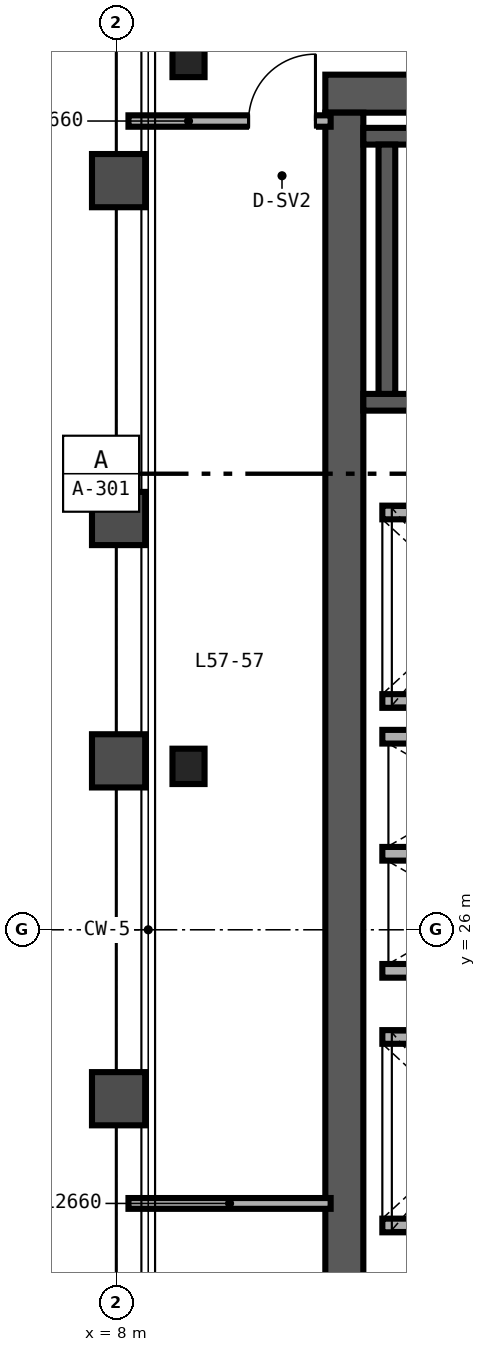
"""IFC4 building model, lengths in metres.
Left out: names, types, materials, properties, quantities, classifications, styles, units other than length and angle.
Written with IfcOpenShell. Run it as: python <this file> out.ifc"""

import sys

from ifc_helpers import new_model, si_unit, direction, frame, frame_2d, origin, origin_2d, place, context, subcontext, project, spatial, rectangle, i_section, extrude, source, transform, mapped, element, fill, save


model = new_model("IFC4")
c1 = context("Model", 3, precision=1e-05, world=origin(), true_north=direction((0.0, 1.0)))
c2 = subcontext(c1, "Body", "Model", "MODEL_VIEW")
j1 = project(units=[si_unit("LENGTHUNIT", "METRE"), si_unit("PLANEANGLEUNIT", "RADIAN")], contexts=[c1])
p1 = place(None, origin())
s1 = spatial("IfcSite", under=j1, at=p1, CompositionType="ELEMENT")
p2 = place(p1, origin())
s2 = spatial("IfcBuilding", under=s1, at=p2, CompositionType="ELEMENT")
p3 = place(p2, frame((0.0, 0.0, 228.0)))
s3 = spatial("IfcBuildingStorey", under=s2, at=p3, CompositionType="ELEMENT", Elevation=228.0)
p4 = place(p3, frame((10.75, 37.0, 0.0), z_axis=(0.0, 0.0, 1.0), x_axis=(1.0, 0.0, 0.0)))
e1 = element("IfcWall", 1, at=p4, inside=s3, PredefinedType="SHEAR", context=c2, shape_type="SweptSolid", body=[
    extrude(rectangle(XDim=12.5, YDim=0.5, at=frame_2d((6.25, 0.0))), origin(), (0.0, 0.0, 1.0), 4.58),
])
p5 = place(p4, frame((10.35, 0.0, 0.0)))
e2 = element("IfcOpeningElement", 2, at=p5, cuts=e1, PredefinedType="OPENING", context=c2, shape_type="SweptSolid", body=[
    extrude(rectangle(XDim=1.0, YDim=2.15, at=frame_2d((0.5, 1.075))), frame((0.0, 0.26, 0.0), z_axis=(0.0, -1.0, 0.0), x_axis=(1.0, 0.0, 0.0)), (0.0, 0.0, 1.0), 0.52),
])
p6 = place(p3, frame((11.0, 15.25, 0.0), z_axis=(0.0, 0.0, 1.0), x_axis=(0.0, 1.0, 0.0)))
e3 = element("IfcWall", 3, at=p6, inside=s3, PredefinedType="SHEAR", context=c2, shape_type="SweptSolid", body=[
    extrude(rectangle(XDim=21.5, YDim=0.5, at=frame_2d((10.75, 0.0))), origin(), (0.0, 0.0, 1.0), 4.58),
])
p7 = place(p3, frame((11.25, 32.94, 0.0), z_axis=(0.0, 0.0, 1.0), x_axis=(1.0, 0.0, 0.0)))
e4 = element("IfcWall", 4, at=p7, inside=s3, PredefinedType="SHEAR", context=c2, shape_type="SweptSolid", body=[
    extrude(rectangle(XDim=8.06, YDim=0.22, at=frame_2d((4.03, 0.0))), origin(), (0.0, 0.0, 1.0), 4.6),
])
p8 = place(p7, frame((0.67, 0.0, 0.0)))
e5 = element("IfcOpeningElement", 5, at=p8, cuts=e4, PredefinedType="OPENING", context=c2, shape_type="SweptSolid", body=[
    extrude(rectangle(XDim=1.05, YDim=2.15, at=frame_2d((0.525, 1.075))), frame((0.0, 0.12, 0.0), z_axis=(0.0, -1.0, 0.0), x_axis=(1.0, 0.0, 0.0)), (0.0, 0.0, 1.0), 0.24),
])
p9 = place(p3, frame((11.25, 36.44, 0.0), z_axis=(0.0, 0.0, 1.0), x_axis=(1.0, 0.0, 0.0)))
e6 = element("IfcWall", 6, at=p9, inside=s3, PredefinedType="SHEAR", context=c2, shape_type="SweptSolid", body=[
    extrude(rectangle(XDim=8.06, YDim=0.22, at=frame_2d((4.03, 0.0))), origin(), (0.0, 0.0, 1.0), 4.6),
])
p10 = place(p3, frame((11.56, 33.05, 0.0), z_axis=(0.0, 0.0, 1.0), x_axis=(0.0, 1.0, 0.0)))
e7 = element("IfcWall", 7, at=p10, inside=s3, PredefinedType="SHEAR", context=c2, shape_type="SweptSolid", body=[
    extrude(rectangle(XDim=3.28, YDim=0.22, at=frame_2d((1.64, 0.0))), origin(), (0.0, 0.0, 1.0), 4.6),
])
m1 = source(origin(), c2, "Body", "SweptSolid", [
    extrude(i_section(OverallWidth=0.422, OverallDepth=0.465, WebThickness=0.045, FlangeThickness=0.073, FilletRadius=0.025, at=origin_2d()), origin(), (0.0, 0.0, 1.0), 4.58),
])
for number, where, z_axis, x_axis in (
    (8, (8.95, 28.15, 0.0), (0.0, 0.0, 1.0), (1.0, 0.0, 0.0)),
    (9, (8.95, 37.45, 0.0), (0.0, 0.0, 1.0), (1.0, 0.0, 0.0)),
):
    element("IfcColumn", number, at=place(p3, frame(where, z_axis=z_axis, x_axis=x_axis)), inside=s3, PredefinedType="COLUMN", context=c2, shape_type="MappedRepresentation", body=[
        mapped(m1, transform((0.0, 0.0, 0.0), scale=1.0)),
    ])
for number, where, z_axis, x_axis in (
    (10, (11.5, 22.11, 0.0), (0.0, 0.0, 1.0), (1.0, 0.0, 0.0)),
    (11, (11.5, 24.59, 0.0), (0.0, 0.0, 1.0), (1.0, 0.0, 0.0)),
    (12, (11.5, 29.01, 0.0), (0.0, 0.0, 1.0), (1.0, 0.0, 0.0)),
    (13, (11.5, 31.49, 0.0), (0.0, 0.0, 1.0), (1.0, 0.0, 0.0)),
):
    element("IfcWall", number, at=place(p3, frame(where, z_axis=z_axis, x_axis=x_axis)), inside=s3, PredefinedType="SOLIDWALL", context=c2, shape_type="SweptSolid", body=[
        extrude(rectangle(XDim=2.5, YDim=0.18, at=frame_2d((1.25, 0.0))), origin(), (0.0, 0.0, 1.0), 4.58),
    ])
for number, where, z_axis, x_axis in (
    (14, (11.5, 25.46, 0.0), (0.0, 0.0, 1.0), (1.0, 0.0, 0.0)),
    (15, (11.5, 27.0, 0.0), (0.0, 0.0, 1.0), (1.0, 0.0, 0.0)),
    (16, (11.5, 28.54, 0.0), (0.0, 0.0, 1.0), (1.0, 0.0, 0.0)),
):
    element("IfcWall", number, at=place(p3, frame(where, z_axis=z_axis, x_axis=x_axis)), inside=s3, PredefinedType="SOLIDWALL", context=c2, shape_type="SweptSolid", body=[
        extrude(rectangle(XDim=2.51, YDim=0.18, at=frame_2d((1.255, 0.0))), origin(), (0.0, 0.0, 1.0), 4.58),
    ])
p11 = place(p3, frame((8.16, 36.64, 0.0), z_axis=(0.0, 0.0, 1.0), x_axis=(1.0, 0.0, 0.0)))
e17 = element("IfcWall", 17, at=p11, inside=s3, PredefinedType="PARTITIONING", context=c2, shape_type="SweptSolid", body=[
    extrude(rectangle(XDim=2.66, YDim=0.15, at=frame_2d((1.33, 0.0))), origin(), (0.0, 0.0, 1.0), 3.963),
])
p12 = place(p11, frame((1.58, 0.0, 0.0)))
e18 = element("IfcOpeningElement", 18, at=p12, cuts=e17, PredefinedType="OPENING", context=c2, shape_type="SweptSolid", body=[
    extrude(rectangle(XDim=0.88, YDim=2.15, at=frame_2d((0.44, 1.075))), frame((0.0, 0.085, 0.0), z_axis=(0.0, -1.0, 0.0), x_axis=(1.0, 0.0, 0.0)), (0.0, 0.0, 1.0), 0.17),
])
p13 = place(p3, frame((8.16, 22.4, 0.0), z_axis=(0.0, 0.0, 1.0), x_axis=(1.0, 0.0, 0.0)))
e19 = element("IfcWall", 19, at=p13, inside=s3, PredefinedType="PARTITIONING", context=c2, shape_type="SweptSolid", body=[
    extrude(rectangle(XDim=2.66, YDim=0.142, at=frame_2d((1.33, 0.0))), origin(), (0.0, 0.0, 1.0), 3.801),
])
m2 = source(origin(), c2, "Body", "SweptSolid", [
    extrude(rectangle(XDim=0.88, YDim=2.15, at=frame_2d((0.44, 1.075))), frame((0.0, 0.025, 0.0), z_axis=(0.0, -1.0, 0.0), x_axis=(1.0, 0.0, 0.0)), (0.0, 0.0, 1.0), 0.05),
])
p14 = place(p12, origin())
e20 = element("IfcDoor", 20, at=p14, inside=s3, OperationType="SINGLE_SWING_RIGHT", PredefinedType="DOOR", context=c2, shape_type="MappedRepresentation", body=[
    mapped(m2, transform((0.0, 0.0, 0.0), scale=1.0)),
])
fill(e18, e20)
save(model, sys.argv[1])
